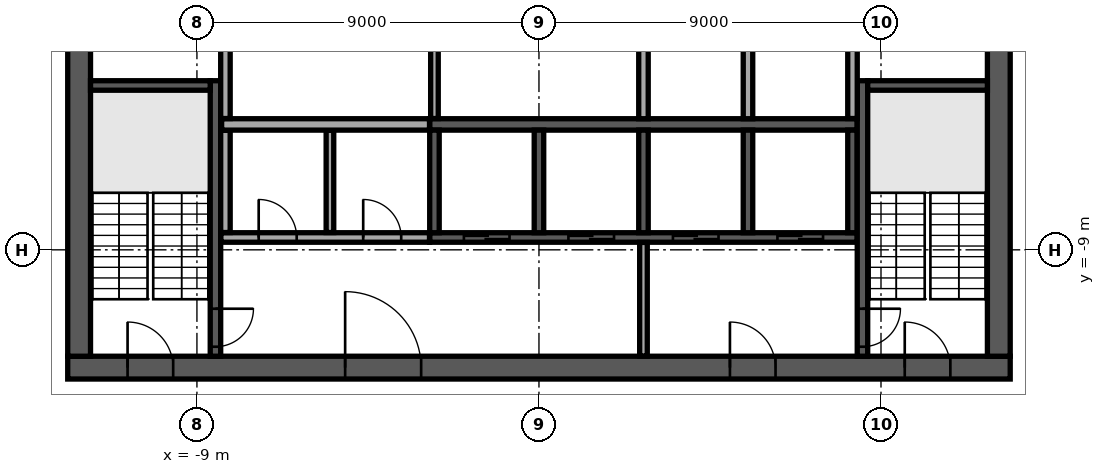
"""IFC4 building model, lengths in metres.
Left out: names, types, materials, properties, quantities, classifications, styles, units other than length and angle.
Written with IfcOpenShell. Run it as: python <this file> out.ifc"""

import sys

from ifc_helpers import new_model, si_unit, direction, frame, frame_2d, origin, place, context, subcontext, project, spatial, rectangle, extrude, element, fill, save


model = new_model("IFC4")
c1 = context("Model", 3, precision=1e-05, world=origin(), true_north=direction((0.0, 1.0)))
c2 = subcontext(c1, "Body", "Model", "MODEL_VIEW")
j1 = project(units=[si_unit("LENGTHUNIT", "METRE"), si_unit("PLANEANGLEUNIT", "RADIAN")], contexts=[c1])
p1 = place(None, origin())
s1 = spatial("IfcSite", under=j1, at=p1, CompositionType="ELEMENT")
p2 = place(p1, origin())
s2 = spatial("IfcBuilding", under=s1, at=p2, CompositionType="ELEMENT")
p3 = place(p2, frame((0.0, 0.0, 332.5)))
s3 = spatial("IfcBuildingStorey", under=s2, at=p3, CompositionType="ELEMENT", Elevation=332.5)
p4 = place(p3, frame((-12.4, -12.1, 0.0), z_axis=(0.0, 0.0, 1.0), x_axis=(1.0, 0.0, 0.0)))
e1 = element("IfcWall", 1, at=p4, inside=s3, PredefinedType="SHEAR", context=c2, shape_type="SweptSolid", body=[
    extrude(rectangle(XDim=24.8, YDim=0.6, at=frame_2d((12.4, 0.0))), origin(), (0.0, 0.0, 1.0), 3.65),
])
p5 = place(p4, frame((7.3, 0.0, 0.0)))
e2 = element("IfcOpeningElement", 2, at=p5, cuts=e1, PredefinedType="OPENING", context=c2, shape_type="SweptSolid", body=[
    extrude(rectangle(XDim=2.0, YDim=2.1, at=frame_2d((1.0, 1.05))), frame((0.0, 0.31, 0.0), z_axis=(0.0, -1.0, 0.0), x_axis=(1.0, 0.0, 0.0)), (0.0, 0.0, 1.0), 0.62),
])
p6 = place(p4, frame((17.425, 0.0, 0.0)))
e3 = element("IfcOpeningElement", 3, at=p6, cuts=e1, PredefinedType="OPENING", context=c2, shape_type="SweptSolid", body=[
    extrude(rectangle(XDim=1.2, YDim=2.1, at=frame_2d((0.6, 1.05))), frame((0.0, 0.31, 0.0), z_axis=(0.0, -1.0, 0.0), x_axis=(1.0, 0.0, 0.0)), (0.0, 0.0, 1.0), 0.62),
])
p7 = place(p4, frame((1.575, 0.0, 0.0)))
e4 = element("IfcOpeningElement", 4, at=p7, cuts=e1, PredefinedType="OPENING", context=c2, shape_type="SweptSolid", body=[
    extrude(rectangle(XDim=1.2, YDim=2.1, at=frame_2d((0.6, 1.05))), frame((0.0, 0.31, 0.0), z_axis=(0.0, -1.0, 0.0), x_axis=(1.0, 0.0, 0.0)), (0.0, 0.0, 1.0), 0.62),
])
p8 = place(p4, frame((22.025, 0.0, 0.0)))
e5 = element("IfcOpeningElement", 5, at=p8, cuts=e1, PredefinedType="OPENING", context=c2, shape_type="SweptSolid", body=[
    extrude(rectangle(XDim=1.2, YDim=2.1, at=frame_2d((0.6, 1.05))), frame((0.0, 0.31, 0.0), z_axis=(0.0, -1.0, 0.0), x_axis=(1.0, 0.0, 0.0)), (0.0, 0.0, 1.0), 0.62),
])
p9 = place(p3, frame((12.1, -11.8, 0.0), z_axis=(0.0, 0.0, 1.0), x_axis=(0.0, 1.0, 0.0)))
e6 = element("IfcWall", 6, at=p9, inside=s3, PredefinedType="SHEAR", context=c2, shape_type="SweptSolid", body=[
    extrude(rectangle(XDim=23.6, YDim=0.6, at=frame_2d((11.8, 0.0))), origin(), (0.0, 0.0, 1.0), 3.65),
])
p10 = place(p9, frame((10.6, 0.0, 0.0)))
e7 = element("IfcOpeningElement", 7, at=p10, cuts=e6, PredefinedType="OPENING", context=c2, shape_type="SweptSolid", body=[
    extrude(rectangle(XDim=2.4, YDim=2.4, at=frame_2d((1.2, 1.2))), frame((0.0, 0.31, 0.0), z_axis=(0.0, -1.0, 0.0), x_axis=(1.0, 0.0, 0.0)), (0.0, 0.0, 1.0), 0.62),
])
p11 = place(p3, frame((-12.1, -11.8, 0.0), z_axis=(0.0, 0.0, 1.0), x_axis=(0.0, 1.0, 0.0)))
e8 = element("IfcWall", 8, at=p11, inside=s3, PredefinedType="SHEAR", context=c2, shape_type="SweptSolid", body=[
    extrude(rectangle(XDim=23.6, YDim=0.6, at=frame_2d((11.8, 0.0))), origin(), (0.0, 0.0, 1.0), 3.65),
])
p12 = place(p11, frame((10.6, 0.0, 0.0)))
e9 = element("IfcOpeningElement", 9, at=p12, cuts=e8, PredefinedType="OPENING", context=c2, shape_type="SweptSolid", body=[
    extrude(rectangle(XDim=2.4, YDim=2.4, at=frame_2d((1.2, 1.2))), frame((0.0, 0.31, 0.0), z_axis=(0.0, -1.0, 0.0), x_axis=(1.0, 0.0, 0.0)), (0.0, 0.0, 1.0), 0.62),
])
p13 = place(p3, frame((-2.875, -5.7, 0.0), z_axis=(0.0, 0.0, 1.0), x_axis=(1.0, 0.0, 0.0)))
e10 = element("IfcWall", 10, at=p13, inside=s3, PredefinedType="SOLIDWALL", context=c2, shape_type="SweptSolid", body=[
    extrude(rectangle(XDim=11.25, YDim=0.3, at=frame_2d((5.625, 0.0))), origin(), (0.0, 0.0, 1.0), 3.65),
])
for number, where, z_axis, x_axis in (
    (11, (2.75, -5.55, 0.0), (0.0, 0.0, 1.0), (0.0, 1.0, 0.0)),
    (12, (5.5, -5.55, 0.0), (0.0, 0.0, 1.0), (0.0, 1.0, 0.0)),
):
    element("IfcWall", number, at=place(p3, frame(where, z_axis=z_axis, x_axis=x_axis)), inside=s3, PredefinedType="SOLIDWALL", context=c2, shape_type="SweptSolid", body=[
        extrude(rectangle(XDim=2.7, YDim=0.25, at=frame_2d((1.35, 0.0))), origin(), (0.0, 0.0, 1.0), 3.65),
    ])
p14 = place(p3, frame((-2.875, -8.675, 0.0), z_axis=(0.0, 0.0, 1.0), x_axis=(1.0, 0.0, 0.0)))
e13 = element("IfcWall", 13, at=p14, inside=s3, PredefinedType="SOLIDWALL", context=c2, shape_type="SweptSolid", body=[
    extrude(rectangle(XDim=11.25, YDim=0.25, at=frame_2d((5.625, 0.0))), origin(), (0.0, 0.0, 1.0), 3.65),
])
p15 = place(p14, frame((0.9, 0.0, 0.0)))
e14 = element("IfcOpeningElement", 14, at=p15, cuts=e13, PredefinedType="OPENING", context=c2, shape_type="SweptSolid", body=[
    extrude(rectangle(XDim=1.2, YDim=2.1, at=frame_2d((0.6, 1.05))), frame((0.0, 0.135, 0.0), z_axis=(0.0, -1.0, 0.0), x_axis=(1.0, 0.0, 0.0)), (0.0, 0.0, 1.0), 0.27),
])
p16 = place(p14, frame((3.65, 0.0, 0.0)))
e15 = element("IfcOpeningElement", 15, at=p16, cuts=e13, PredefinedType="OPENING", context=c2, shape_type="SweptSolid", body=[
    extrude(rectangle(XDim=1.2, YDim=2.1, at=frame_2d((0.6, 1.05))), frame((0.0, 0.135, 0.0), z_axis=(0.0, -1.0, 0.0), x_axis=(1.0, 0.0, 0.0)), (0.0, 0.0, 1.0), 0.27),
])
p17 = place(p14, frame((6.4, 0.0, 0.0)))
e16 = element("IfcOpeningElement", 16, at=p17, cuts=e13, PredefinedType="OPENING", context=c2, shape_type="SweptSolid", body=[
    extrude(rectangle(XDim=1.2, YDim=2.1, at=frame_2d((0.6, 1.05))), frame((0.0, 0.135, 0.0), z_axis=(0.0, -1.0, 0.0), x_axis=(1.0, 0.0, 0.0)), (0.0, 0.0, 1.0), 0.27),
])
p18 = place(p14, frame((9.15, 0.0, 0.0)))
e17 = element("IfcOpeningElement", 17, at=p18, cuts=e13, PredefinedType="OPENING", context=c2, shape_type="SweptSolid", body=[
    extrude(rectangle(XDim=1.2, YDim=2.1, at=frame_2d((0.6, 1.05))), frame((0.0, 0.135, 0.0), z_axis=(0.0, -1.0, 0.0), x_axis=(1.0, 0.0, 0.0)), (0.0, 0.0, 1.0), 0.27),
])
for number, where, z_axis, x_axis in (
    (18, (-2.75, -8.55, 0.0), (0.0, 0.0, 1.0), (0.0, 1.0, 0.0)),
    (19, (0.0, -8.55, 0.0), (0.0, 0.0, 1.0), (0.0, 1.0, 0.0)),
    (20, (2.75, -8.55, 0.0), (0.0, 0.0, 1.0), (0.0, 1.0, 0.0)),
    (21, (5.5, -8.55, 0.0), (0.0, 0.0, 1.0), (0.0, 1.0, 0.0)),
    (22, (8.25, -8.55, 0.0), (0.0, 0.0, 1.0), (0.0, 1.0, 0.0)),
):
    element("IfcWall", number, at=place(p3, frame(where, z_axis=z_axis, x_axis=x_axis)), inside=s3, PredefinedType="SOLIDWALL", context=c2, shape_type="SweptSolid", body=[
        extrude(rectangle(XDim=2.7, YDim=0.25, at=frame_2d((1.35, 0.0))), origin(), (0.0, 0.0, 1.0), 3.65),
    ])
p19 = place(p3, frame((-8.512, -4.55, 0.0), z_axis=(0.0, 0.0, 1.0), x_axis=(0.0, -1.0, 0.0)))
e23 = element("IfcWall", 23, at=p19, inside=s3, PredefinedType="SOLIDWALL", context=c2, shape_type="SweptSolid", body=[
    extrude(rectangle(XDim=7.25, YDim=0.275, at=frame_2d((3.625, 0.0))), origin(), (0.0, 0.0, 1.0), 3.65),
])
p20 = place(p19, frame((6.0, 0.0, 0.0)))
e24 = element("IfcOpeningElement", 24, at=p20, cuts=e23, PredefinedType="OPENING", context=c2, shape_type="SweptSolid", body=[
    extrude(rectangle(XDim=1.0, YDim=2.1, at=frame_2d((0.5, 1.05))), frame((0.0, 0.147, 0.0), z_axis=(0.0, -1.0, 0.0), x_axis=(1.0, 0.0, 0.0)), (0.0, 0.0, 1.0), 0.295),
])
p21 = place(p3, frame((-8.65, -4.675, 0.0), z_axis=(0.0, 0.0, 1.0), x_axis=(-1.0, 0.0, 0.0)))
e25 = element("IfcWall", 25, at=p21, inside=s3, PredefinedType="SOLIDWALL", context=c2, shape_type="SweptSolid", body=[
    extrude(rectangle(XDim=3.15, YDim=0.25, at=frame_2d((1.575, 0.0))), origin(), (0.0, 0.0, 1.0), 3.65),
])
p22 = place(p3, frame((8.512, -4.55, 0.0), z_axis=(0.0, 0.0, 1.0), x_axis=(0.0, -1.0, 0.0)))
e26 = element("IfcWall", 26, at=p22, inside=s3, PredefinedType="SOLIDWALL", context=c2, shape_type="SweptSolid", body=[
    extrude(rectangle(XDim=7.25, YDim=0.275, at=frame_2d((3.625, 0.0))), origin(), (0.0, 0.0, 1.0), 3.65),
])
p23 = place(p22, frame((6.0, 0.0, 0.0)))
e27 = element("IfcOpeningElement", 27, at=p23, cuts=e26, PredefinedType="OPENING", context=c2, shape_type="SweptSolid", body=[
    extrude(rectangle(XDim=1.0, YDim=2.1, at=frame_2d((0.5, 1.05))), frame((0.0, 0.147, 0.0), z_axis=(0.0, -1.0, 0.0), x_axis=(1.0, 0.0, 0.0)), (0.0, 0.0, 1.0), 0.295),
])
p24 = place(p3, frame((8.65, -4.675, 0.0), z_axis=(0.0, 0.0, 1.0), x_axis=(1.0, 0.0, 0.0)))
e28 = element("IfcWall", 28, at=p24, inside=s3, PredefinedType="SOLIDWALL", context=c2, shape_type="SweptSolid", body=[
    extrude(rectangle(XDim=3.15, YDim=0.25, at=frame_2d((1.575, 0.0))), origin(), (0.0, 0.0, 1.0), 3.65),
])
p25 = place(p3, frame((2.75, -11.795, 0.0), z_axis=(0.0, 0.0, 1.0), x_axis=(0.0, 1.0, 0.0)))
e29 = element("IfcWall", 29, at=p25, inside=s3, PredefinedType="PARTITIONING", context=c2, shape_type="SweptSolid", body=[
    extrude(rectangle(XDim=2.99, YDim=0.2, at=frame_2d((1.495, 0.0))), origin(), (0.0, 0.0, 1.0), 3.65),
])
p26 = place(p3, frame((-8.37, -8.675, 0.0), z_axis=(0.0, 0.0, 1.0), x_axis=(1.0, 0.0, 0.0)))
e30 = element("IfcWall", 30, at=p26, inside=s3, PredefinedType="PARTITIONING", context=c2, shape_type="SweptSolid", body=[
    extrude(rectangle(XDim=5.49, YDim=0.25, at=frame_2d((2.745, 0.0))), origin(), (0.0, 0.0, 1.0), 3.65),
])
p27 = place(p26, frame((0.995, 0.0, 0.0)))
e31 = element("IfcOpeningElement", 31, at=p27, cuts=e30, PredefinedType="OPENING", context=c2, shape_type="SweptSolid", body=[
    extrude(rectangle(XDim=1.0, YDim=2.1, at=frame_2d((0.5, 1.05))), frame((0.0, 0.135, 0.0), z_axis=(0.0, -1.0, 0.0), x_axis=(1.0, 0.0, 0.0)), (0.0, 0.0, 1.0), 0.27),
])
p28 = place(p26, frame((3.745, 0.0, 0.0)))
e32 = element("IfcOpeningElement", 32, at=p28, cuts=e30, PredefinedType="OPENING", context=c2, shape_type="SweptSolid", body=[
    extrude(rectangle(XDim=1.0, YDim=2.1, at=frame_2d((0.5, 1.05))), frame((0.0, 0.135, 0.0), z_axis=(0.0, -1.0, 0.0), x_axis=(1.0, 0.0, 0.0)), (0.0, 0.0, 1.0), 0.27),
])
p29 = place(p3, frame((-8.25, -8.545, 0.0), z_axis=(0.0, 0.0, 1.0), x_axis=(0.0, 1.0, 0.0)))
e33 = element("IfcWall", 33, at=p29, inside=s3, PredefinedType="PARTITIONING", context=c2, shape_type="SweptSolid", body=[
    extrude(rectangle(XDim=2.69, YDim=0.25, at=frame_2d((1.345, 0.0))), origin(), (0.0, 0.0, 1.0), 3.65),
])
p30 = place(p3, frame((-5.5, -8.545, 0.0), z_axis=(0.0, 0.0, 1.0), x_axis=(0.0, 1.0, 0.0)))
e34 = element("IfcWall", 34, at=p30, inside=s3, PredefinedType="PARTITIONING", context=c2, shape_type="SweptSolid", body=[
    extrude(rectangle(XDim=2.69, YDim=0.2, at=frame_2d((1.345, 0.0))), origin(), (0.0, 0.0, 1.0), 3.65),
])
p31 = place(p3, frame((-8.35, -5.7, 0.0), z_axis=(0.0, 0.0, 1.0), x_axis=(1.0, 0.0, 0.0)))
e35 = element("IfcWall", 35, at=p31, inside=s3, PredefinedType="PARTITIONING", context=c2, shape_type="SweptSolid", body=[
    extrude(rectangle(XDim=5.47, YDim=0.3, at=frame_2d((2.735, 0.0))), origin(), (0.0, 0.0, 1.0), 3.65),
])
p32 = place(p3, frame((-8.25, -5.545, 0.0), z_axis=(0.0, 0.0, 1.0), x_axis=(0.0, 1.0, 0.0)))
e36 = element("IfcWall", 36, at=p32, inside=s3, PredefinedType="PARTITIONING", context=c2, shape_type="SweptSolid", body=[
    extrude(rectangle(XDim=2.69, YDim=0.25, at=frame_2d((1.345, 0.0))), origin(), (0.0, 0.0, 1.0), 3.65),
])
p33 = place(p3, frame((-2.75, -5.545, 0.0), z_axis=(0.0, 0.0, 1.0), x_axis=(0.0, 1.0, 0.0)))
e37 = element("IfcWall", 37, at=p33, inside=s3, PredefinedType="PARTITIONING", context=c2, shape_type="SweptSolid", body=[
    extrude(rectangle(XDim=2.69, YDim=0.2, at=frame_2d((1.345, 0.0))), origin(), (0.0, 0.0, 1.0), 3.65),
])
p34 = place(p3, frame((8.25, -5.545, 0.0), z_axis=(0.0, 0.0, 1.0), x_axis=(0.0, 1.0, 0.0)))
e38 = element("IfcWall", 38, at=p34, inside=s3, PredefinedType="PARTITIONING", context=c2, shape_type="SweptSolid", body=[
    extrude(rectangle(XDim=2.69, YDim=0.25, at=frame_2d((1.345, 0.0))), origin(), (0.0, 0.0, 1.0), 3.65),
])
p35 = place(p5, origin())
e39 = element("IfcDoor", 39, at=p35, inside=s3, OperationType="SINGLE_SWING_LEFT", PredefinedType="DOOR", context=c2, shape_type="SweptSolid", body=[
    extrude(rectangle(XDim=2.0, YDim=2.1, at=frame_2d((1.0, 1.05))), frame((0.0, 0.025, 0.0), z_axis=(0.0, -1.0, 0.0), x_axis=(1.0, 0.0, 0.0)), (0.0, 0.0, 1.0), 0.05),
])
fill(e2, e39)
p36 = place(p6, origin())
e40 = element("IfcDoor", 40, at=p36, inside=s3, OperationType="SINGLE_SWING_LEFT", PredefinedType="DOOR", context=c2, shape_type="SweptSolid", body=[
    extrude(rectangle(XDim=1.2, YDim=2.1, at=frame_2d((0.6, 1.05))), frame((0.0, 0.025, 0.0), z_axis=(0.0, -1.0, 0.0), x_axis=(1.0, 0.0, 0.0)), (0.0, 0.0, 1.0), 0.05),
])
fill(e3, e40)
p37 = place(p7, origin())
e41 = element("IfcDoor", 41, at=p37, inside=s3, OperationType="SINGLE_SWING_LEFT", PredefinedType="DOOR", context=c2, shape_type="SweptSolid", body=[
    extrude(rectangle(XDim=1.2, YDim=2.1, at=frame_2d((0.6, 1.05))), frame((0.0, 0.025, 0.0), z_axis=(0.0, -1.0, 0.0), x_axis=(1.0, 0.0, 0.0)), (0.0, 0.0, 1.0), 0.05),
])
fill(e4, e41)
p38 = place(p8, origin())
e42 = element("IfcDoor", 42, at=p38, inside=s3, OperationType="SINGLE_SWING_LEFT", PredefinedType="DOOR", context=c2, shape_type="SweptSolid", body=[
    extrude(rectangle(XDim=1.2, YDim=2.1, at=frame_2d((0.6, 1.05))), frame((0.0, 0.025, 0.0), z_axis=(0.0, -1.0, 0.0), x_axis=(1.0, 0.0, 0.0)), (0.0, 0.0, 1.0), 0.05),
])
fill(e5, e42)
p39 = place(p15, origin())
e43 = element("IfcDoor", 43, at=p39, inside=s3, OperationType="DOUBLE_DOOR_SLIDING", PredefinedType="DOOR", context=c2, shape_type="SweptSolid", body=[
    extrude(rectangle(XDim=1.2, YDim=2.1, at=frame_2d((0.6, 1.05))), frame((0.0, 0.025, 0.0), z_axis=(0.0, -1.0, 0.0), x_axis=(1.0, 0.0, 0.0)), (0.0, 0.0, 1.0), 0.05),
])
fill(e14, e43)
p40 = place(p16, origin())
e44 = element("IfcDoor", 44, at=p40, inside=s3, OperationType="DOUBLE_DOOR_SLIDING", PredefinedType="DOOR", context=c2, shape_type="SweptSolid", body=[
    extrude(rectangle(XDim=1.2, YDim=2.1, at=frame_2d((0.6, 1.05))), frame((0.0, 0.025, 0.0), z_axis=(0.0, -1.0, 0.0), x_axis=(1.0, 0.0, 0.0)), (0.0, 0.0, 1.0), 0.05),
])
fill(e15, e44)
p41 = place(p17, origin())
e45 = element("IfcDoor", 45, at=p41, inside=s3, OperationType="DOUBLE_DOOR_SLIDING", PredefinedType="DOOR", context=c2, shape_type="SweptSolid", body=[
    extrude(rectangle(XDim=1.2, YDim=2.1, at=frame_2d((0.6, 1.05))), frame((0.0, 0.025, 0.0), z_axis=(0.0, -1.0, 0.0), x_axis=(1.0, 0.0, 0.0)), (0.0, 0.0, 1.0), 0.05),
])
fill(e16, e45)
p42 = place(p18, origin())
e46 = element("IfcDoor", 46, at=p42, inside=s3, OperationType="DOUBLE_DOOR_SLIDING", PredefinedType="DOOR", context=c2, shape_type="SweptSolid", body=[
    extrude(rectangle(XDim=1.2, YDim=2.1, at=frame_2d((0.6, 1.05))), frame((0.0, 0.025, 0.0), z_axis=(0.0, -1.0, 0.0), x_axis=(1.0, 0.0, 0.0)), (0.0, 0.0, 1.0), 0.05),
])
fill(e17, e46)
p43 = place(p20, origin())
e47 = element("IfcDoor", 47, at=p43, inside=s3, OperationType="SINGLE_SWING_LEFT", PredefinedType="DOOR", context=c2, shape_type="SweptSolid", body=[
    extrude(rectangle(XDim=1.0, YDim=2.1, at=frame_2d((0.5, 1.05))), frame((0.0, 0.025, 0.0), z_axis=(0.0, -1.0, 0.0), x_axis=(1.0, 0.0, 0.0)), (0.0, 0.0, 1.0), 0.05),
])
fill(e24, e47)
p44 = place(p23, origin())
e48 = element("IfcDoor", 48, at=p44, inside=s3, OperationType="SINGLE_SWING_LEFT", PredefinedType="DOOR", context=c2, shape_type="SweptSolid", body=[
    extrude(rectangle(XDim=1.0, YDim=2.1, at=frame_2d((0.5, 1.05))), frame((0.0, 0.025, 0.0), z_axis=(0.0, -1.0, 0.0), x_axis=(1.0, 0.0, 0.0)), (0.0, 0.0, 1.0), 0.05),
])
fill(e27, e48)
p45 = place(p27, origin())
e49 = element("IfcDoor", 49, at=p45, inside=s3, OperationType="SINGLE_SWING_RIGHT", PredefinedType="DOOR", context=c2, shape_type="SweptSolid", body=[
    extrude(rectangle(XDim=1.0, YDim=2.1, at=frame_2d((0.5, 1.05))), frame((0.0, 0.025, 0.0), z_axis=(0.0, -1.0, 0.0), x_axis=(1.0, 0.0, 0.0)), (0.0, 0.0, 1.0), 0.05),
])
fill(e31, e49)
p46 = place(p28, origin())
e50 = element("IfcDoor", 50, at=p46, inside=s3, OperationType="SINGLE_SWING_RIGHT", PredefinedType="DOOR", context=c2, shape_type="SweptSolid", body=[
    extrude(rectangle(XDim=1.0, YDim=2.1, at=frame_2d((0.5, 1.05))), frame((0.0, 0.025, 0.0), z_axis=(0.0, -1.0, 0.0), x_axis=(1.0, 0.0, 0.0)), (0.0, 0.0, 1.0), 0.05),
])
fill(e32, e50)
save(model, sys.argv[1])
